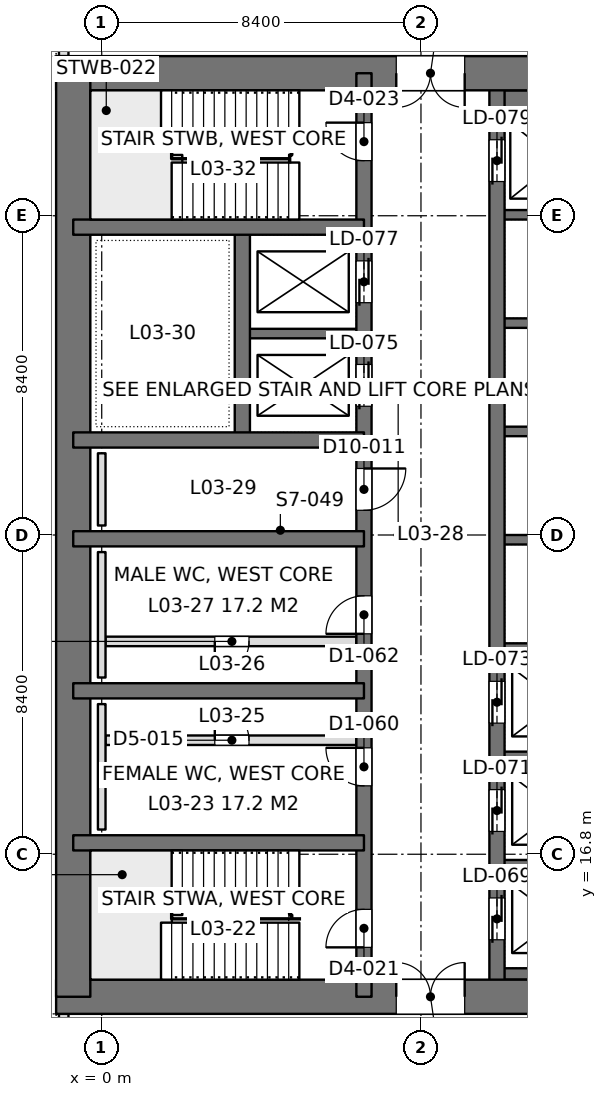
"""IFC4 building model, lengths in metres.
Left out: names, types, materials, properties, quantities, classifications, styles, units other than length and angle.
Written with IfcOpenShell. Run it as: python <this file> out.ifc"""

import sys

from ifc_helpers import new_model, si_unit, direction, frame, frame_2d, origin, place, context, subcontext, project, spatial, rectangle, extrude, element, fill, save


model = new_model("IFC4")
c1 = context("Model", 3, precision=1e-05, world=origin(), true_north=direction((0.0, 1.0)))
c2 = subcontext(c1, "Body", "Model", "MODEL_VIEW")
j1 = project(units=[si_unit("LENGTHUNIT", "METRE"), si_unit("PLANEANGLEUNIT", "RADIAN")], contexts=[c1])
p1 = place(None, origin())
s1 = spatial("IfcSite", under=j1, at=p1, CompositionType="ELEMENT")
p2 = place(p1, origin())
s2 = spatial("IfcBuilding", under=s1, at=p2, CompositionType="ELEMENT")
p3 = place(p2, frame((0.0, 0.0, 14.4)))
s3 = spatial("IfcBuildingStorey", under=s2, at=p3, CompositionType="ELEMENT", Elevation=14.4)
p4 = place(p3, frame((-1.2, 13.05, 0.0), z_axis=(0.0, 0.0, 1.0), x_axis=(1.0, 0.0, 0.0)))
e1 = element("IfcWall", 1, at=p4, inside=s3, PredefinedType="SHEAR", context=c2, shape_type="SweptSolid", body=[
    extrude(rectangle(XDim=18.0, YDim=0.9, at=frame_2d((9.0, 0.0))), origin(), (0.0, 0.0, 1.0), 4.5),
])
p5 = place(p4, frame((8.95, 0.0, 0.0)))
e2 = element("IfcOpeningElement", 2, at=p5, cuts=e1, PredefinedType="OPENING", context=c2, shape_type="SweptSolid", body=[
    extrude(rectangle(XDim=1.8, YDim=2.4, at=frame_2d((0.9, 1.2))), frame((0.0, 0.46, 0.0), z_axis=(0.0, -1.0, 0.0), x_axis=(1.0, 0.0, 0.0)), (0.0, 0.0, 1.0), 0.92),
])
p6 = place(p3, frame((-1.2, 37.35, 0.0), z_axis=(0.0, 0.0, 1.0), x_axis=(1.0, 0.0, 0.0)))
e3 = element("IfcWall", 3, at=p6, inside=s3, PredefinedType="SHEAR", context=c2, shape_type="SweptSolid", body=[
    extrude(rectangle(XDim=18.0, YDim=0.9, at=frame_2d((9.0, 0.0))), origin(), (0.0, 0.0, 1.0), 4.5),
])
p7 = place(p6, frame((8.95, 0.0, 0.0)))
e4 = element("IfcOpeningElement", 4, at=p7, cuts=e3, PredefinedType="OPENING", context=c2, shape_type="SweptSolid", body=[
    extrude(rectangle(XDim=1.8, YDim=2.4, at=frame_2d((0.9, 1.2))), frame((0.0, 0.46, 0.0), z_axis=(0.0, -1.0, 0.0), x_axis=(1.0, 0.0, 0.0)), (0.0, 0.0, 1.0), 0.92),
])
p8 = place(p3, frame((-0.75, 13.05, 0.0), z_axis=(0.0, 0.0, 1.0), x_axis=(0.0, 1.0, 0.0)))
e5 = element("IfcWall", 5, at=p8, inside=s3, PredefinedType="SHEAR", context=c2, shape_type="SweptSolid", body=[
    extrude(rectangle(XDim=24.3, YDim=0.9, at=frame_2d((12.15, 0.0))), origin(), (0.0, 0.0, 1.0), 4.5),
])
p9 = place(p3, frame((6.9, 13.05, 0.0), z_axis=(0.0, 0.0, 1.0), x_axis=(0.0, 1.0, 0.0)))
e6 = element("IfcWall", 6, at=p9, inside=s3, PredefinedType="SHEAR", context=c2, shape_type="SweptSolid", body=[
    extrude(rectangle(XDim=24.3, YDim=0.4, at=frame_2d((12.15, 0.0))), origin(), (0.0, 0.0, 1.0), 4.5),
])
p10 = place(p9, frame((1.3, 0.0, 0.0)))
e7 = element("IfcOpeningElement", 7, at=p10, cuts=e6, PredefinedType="OPENING", context=c2, shape_type="SweptSolid", body=[
    extrude(rectangle(XDim=1.0, YDim=2.2, at=frame_2d((0.5, 1.1))), frame((0.0, 0.21, 0.0), z_axis=(0.0, -1.0, 0.0), x_axis=(1.0, 0.0, 0.0)), (0.0, 0.0, 1.0), 0.42),
])
p11 = place(p9, frame((22.0, 0.0, 0.0)))
e8 = element("IfcOpeningElement", 8, at=p11, cuts=e6, PredefinedType="OPENING", context=c2, shape_type="SweptSolid", body=[
    extrude(rectangle(XDim=1.0, YDim=2.2, at=frame_2d((0.5, 1.1))), frame((0.0, 0.21, 0.0), z_axis=(0.0, -1.0, 0.0), x_axis=(1.0, 0.0, 0.0)), (0.0, 0.0, 1.0), 0.42),
])
p12 = place(p9, frame((5.55, 0.0, 0.0)))
e9 = element("IfcOpeningElement", 9, at=p12, cuts=e6, PredefinedType="OPENING", context=c2, shape_type="SweptSolid", body=[
    extrude(rectangle(XDim=1.0, YDim=2.2, at=frame_2d((0.5, 1.1))), frame((0.0, 0.21, 0.0), z_axis=(0.0, -1.0, 0.0), x_axis=(1.0, 0.0, 0.0)), (0.0, 0.0, 1.0), 0.42),
])
p13 = place(p9, frame((9.55, 0.0, 0.0)))
e10 = element("IfcOpeningElement", 10, at=p13, cuts=e6, PredefinedType="OPENING", context=c2, shape_type="SweptSolid", body=[
    extrude(rectangle(XDim=1.0, YDim=2.2, at=frame_2d((0.5, 1.1))), frame((0.0, 0.21, 0.0), z_axis=(0.0, -1.0, 0.0), x_axis=(1.0, 0.0, 0.0)), (0.0, 0.0, 1.0), 0.42),
])
p14 = place(p9, frame((12.8, 0.0, 0.0)))
e11 = element("IfcOpeningElement", 11, at=p14, cuts=e6, PredefinedType="OPENING", context=c2, shape_type="SweptSolid", body=[
    extrude(rectangle(XDim=1.1, YDim=2.2, at=frame_2d((0.55, 1.1))), frame((0.0, 0.21, 0.0), z_axis=(0.0, -1.0, 0.0), x_axis=(1.0, 0.0, 0.0)), (0.0, 0.0, 1.0), 0.42),
])
p15 = place(p9, frame((15.538, 0.0, 0.0)))
e12 = element("IfcOpeningElement", 12, at=p15, cuts=e6, PredefinedType="OPENING", context=c2, shape_type="SweptSolid", body=[
    extrude(rectangle(XDim=1.1, YDim=2.2, at=frame_2d((0.55, 1.1))), frame((0.0, 0.21, 0.0), z_axis=(0.0, -1.0, 0.0), x_axis=(1.0, 0.0, 0.0)), (0.0, 0.0, 1.0), 0.42),
])
p16 = place(p9, frame((18.262, 0.0, 0.0)))
e13 = element("IfcOpeningElement", 13, at=p16, cuts=e6, PredefinedType="OPENING", context=c2, shape_type="SweptSolid", body=[
    extrude(rectangle(XDim=1.1, YDim=2.2, at=frame_2d((0.55, 1.1))), frame((0.0, 0.21, 0.0), z_axis=(0.0, -1.0, 0.0), x_axis=(1.0, 0.0, 0.0)), (0.0, 0.0, 1.0), 0.42),
])
p17 = place(p3, frame((10.4, 13.05, 0.0), z_axis=(0.0, 0.0, 1.0), x_axis=(0.0, 1.0, 0.0)))
e14 = element("IfcWall", 14, at=p17, inside=s3, PredefinedType="SHEAR", context=c2, shape_type="SweptSolid", body=[
    extrude(rectangle(XDim=24.3, YDim=0.4, at=frame_2d((12.15, 0.0))), origin(), (0.0, 0.0, 1.0), 4.5),
])
p18 = place(p17, frame((1.5, 0.0, 0.0)))
e15 = element("IfcOpeningElement", 15, at=p18, cuts=e14, PredefinedType="OPENING", context=c2, shape_type="SweptSolid", body=[
    extrude(rectangle(XDim=1.1, YDim=2.2, at=frame_2d((0.55, 1.1))), frame((0.0, 0.21, 0.0), z_axis=(0.0, -1.0, 0.0), x_axis=(1.0, 0.0, 0.0)), (0.0, 0.0, 1.0), 0.42),
])
p19 = place(p17, frame((4.35, 0.0, 0.0)))
e16 = element("IfcOpeningElement", 16, at=p19, cuts=e14, PredefinedType="OPENING", context=c2, shape_type="SweptSolid", body=[
    extrude(rectangle(XDim=1.1, YDim=2.2, at=frame_2d((0.55, 1.1))), frame((0.0, 0.21, 0.0), z_axis=(0.0, -1.0, 0.0), x_axis=(1.0, 0.0, 0.0)), (0.0, 0.0, 1.0), 0.42),
])
p20 = place(p17, frame((7.2, 0.0, 0.0)))
e17 = element("IfcOpeningElement", 17, at=p20, cuts=e14, PredefinedType="OPENING", context=c2, shape_type="SweptSolid", body=[
    extrude(rectangle(XDim=1.1, YDim=2.2, at=frame_2d((0.55, 1.1))), frame((0.0, 0.21, 0.0), z_axis=(0.0, -1.0, 0.0), x_axis=(1.0, 0.0, 0.0)), (0.0, 0.0, 1.0), 0.42),
])
p21 = place(p17, frame((21.45, 0.0, 0.0)))
e18 = element("IfcOpeningElement", 18, at=p21, cuts=e14, PredefinedType="OPENING", context=c2, shape_type="SweptSolid", body=[
    extrude(rectangle(XDim=1.1, YDim=2.2, at=frame_2d((0.55, 1.1))), frame((0.0, 0.21, 0.0), z_axis=(0.0, -1.0, 0.0), x_axis=(1.0, 0.0, 0.0)), (0.0, 0.0, 1.0), 0.42),
])
for number, where, z_axis, x_axis in (
    (19, (-0.75, 17.1, 0.0), (0.0, 0.0, 1.0), (1.0, 0.0, 0.0)),
    (20, (-0.75, 21.1, 0.0), (0.0, 0.0, 1.0), (1.0, 0.0, 0.0)),
    (21, (-0.75, 25.1, 0.0), (0.0, 0.0, 1.0), (1.0, 0.0, 0.0)),
    (22, (-0.75, 27.7, 0.0), (0.0, 0.0, 1.0), (1.0, 0.0, 0.0)),
    (23, (-0.75, 33.3, 0.0), (0.0, 0.0, 1.0), (1.0, 0.0, 0.0)),
):
    element("IfcWall", number, at=place(p3, frame(where, z_axis=z_axis, x_axis=x_axis)), inside=s3, PredefinedType="SHEAR", context=c2, shape_type="SweptSolid", body=[
        extrude(rectangle(XDim=7.65, YDim=0.4, at=frame_2d((3.825, 0.0))), origin(), (0.0, 0.0, 1.0), 4.5),
    ])
p22 = place(p3, frame((3.7, 27.7, 0.0), z_axis=(0.0, 0.0, 1.0), x_axis=(0.0, 1.0, 0.0)))
e24 = element("IfcWall", 24, at=p22, inside=s3, PredefinedType="SHEAR", context=c2, shape_type="SweptSolid", body=[
    extrude(rectangle(XDim=5.6, YDim=0.4, at=frame_2d((2.8, 0.0))), origin(), (0.0, 0.0, 1.0), 4.5),
])
p23 = place(p3, frame((3.7, 30.5, 0.0), z_axis=(0.0, 0.0, 1.0), x_axis=(1.0, 0.0, 0.0)))
e25 = element("IfcWall", 25, at=p23, inside=s3, PredefinedType="SHEAR", context=c2, shape_type="SweptSolid", body=[
    extrude(rectangle(XDim=3.2, YDim=0.25, at=frame_2d((1.6, 0.0))), origin(), (0.0, 0.0, 1.0), 4.5),
])
p24 = place(p3, frame((10.4, 13.65, 0.0), z_axis=(0.0, 0.0, 1.0), x_axis=(1.0, 0.0, 0.0)))
e26 = element("IfcWall", 26, at=p24, inside=s3, PredefinedType="SHEAR", context=c2, shape_type="SweptSolid", body=[
    extrude(rectangle(XDim=3.2, YDim=0.3, at=frame_2d((1.6, 0.0))), origin(), (0.0, 0.0, 1.0), 4.5),
])
for number, where, z_axis, x_axis in (
    (27, (10.4, 16.525, 0.0), (0.0, 0.0, 1.0), (1.0, 0.0, 0.0)),
    (28, (10.4, 19.375, 0.0), (0.0, 0.0, 1.0), (1.0, 0.0, 0.0)),
    (29, (10.4, 22.225, 0.0), (0.0, 0.0, 1.0), (1.0, 0.0, 0.0)),
    (30, (10.4, 25.075, 0.0), (0.0, 0.0, 1.0), (1.0, 0.0, 0.0)),
    (31, (10.4, 27.925, 0.0), (0.0, 0.0, 1.0), (1.0, 0.0, 0.0)),
    (32, (10.4, 30.775, 0.0), (0.0, 0.0, 1.0), (1.0, 0.0, 0.0)),
    (33, (10.4, 33.625, 0.0), (0.0, 0.0, 1.0), (1.0, 0.0, 0.0)),
):
    element("IfcWall", number, at=place(p3, frame(where, z_axis=z_axis, x_axis=x_axis)), inside=s3, PredefinedType="SHEAR", context=c2, shape_type="SweptSolid", body=[
        extrude(rectangle(XDim=3.2, YDim=0.25, at=frame_2d((1.6, 0.0))), origin(), (0.0, 0.0, 1.0), 4.5),
    ])
p25 = place(p3, frame((10.4, 36.625, 0.0), z_axis=(0.0, 0.0, 1.0), x_axis=(1.0, 0.0, 0.0)))
e34 = element("IfcWall", 34, at=p25, inside=s3, PredefinedType="SHEAR", context=c2, shape_type="SweptSolid", body=[
    extrude(rectangle(XDim=3.2, YDim=0.55, at=frame_2d((1.6, 0.0))), origin(), (0.0, 0.0, 1.0), 4.5),
])
p26 = place(p3, frame((-1.0, -1.0, 0.0), z_axis=(0.0, 0.0, 1.0), x_axis=(0.0, 1.0, 0.0)))
e35 = element("IfcWall", 35, at=p26, inside=s3, PredefinedType="PARTITIONING", context=c2, shape_type="SweptSolid", body=[
    extrude(rectangle(XDim=13.602, YDim=0.25, at=frame_2d((6.801, 0.0))), origin(), (0.0, 0.0, 1.0), 3.45),
])
p27 = place(p26, frame((4.75, 0.0, 0.0)))
e36 = element("IfcOpeningElement", 36, at=p27, cuts=e35, PredefinedType="OPENING", context=c2, shape_type="SweptSolid", body=[
    extrude(rectangle(XDim=0.9, YDim=2.2, at=frame_2d((0.45, 1.1))), frame((0.0, 0.135, 0.0), z_axis=(0.0, -1.0, 0.0), x_axis=(1.0, 0.0, 0.0)), (0.0, 0.0, 1.0), 0.27),
])
p28 = place(p3, frame((-1.0, 37.8, 0.0), z_axis=(0.0, 0.0, 1.0), x_axis=(0.0, 1.0, 0.0)))
e37 = element("IfcWall", 37, at=p28, inside=s3, PredefinedType="PARTITIONING", context=c2, shape_type="SweptSolid", body=[
    extrude(rectangle(XDim=6.48, YDim=0.25, at=frame_2d((3.24, 0.0))), origin(), (0.0, 0.0, 1.0), 3.45),
])
p29 = place(p28, frame((1.65, 0.0, 0.0)))
e38 = element("IfcOpeningElement", 38, at=p29, cuts=e37, PredefinedType="OPENING", context=c2, shape_type="SweptSolid", body=[
    extrude(rectangle(XDim=0.9, YDim=2.2, at=frame_2d((0.45, 1.1))), frame((0.0, 0.135, 0.0), z_axis=(0.0, -1.0, 0.0), x_axis=(1.0, 0.0, 0.0)), (0.0, 0.0, 1.0), 0.27),
])
p30 = place(p3, frame((0.1, 22.4, 0.0), z_axis=(0.0, 0.0, 1.0), x_axis=(1.0, 0.0, 0.0)))
e39 = element("IfcWall", 39, at=p30, inside=s3, PredefinedType="PARTITIONING", context=c2, shape_type="SweptSolid", body=[
    extrude(rectangle(XDim=6.6, YDim=0.25, at=frame_2d((3.3, 0.0))), origin(), (0.0, 0.0, 1.0), 4.3),
])
p31 = place(p30, frame((2.875, 0.0, 0.0)))
e40 = element("IfcOpeningElement", 40, at=p31, cuts=e39, PredefinedType="OPENING", context=c2, shape_type="SweptSolid", body=[
    extrude(rectangle(XDim=0.9, YDim=2.2, at=frame_2d((0.45, 1.1))), frame((0.0, 0.135, 0.0), z_axis=(0.0, -1.0, 0.0), x_axis=(1.0, 0.0, 0.0)), (0.0, 0.0, 1.0), 0.27),
])
p32 = place(p3, frame((0.1, 19.8, 0.0), z_axis=(0.0, 0.0, 1.0), x_axis=(1.0, 0.0, 0.0)))
e41 = element("IfcWall", 41, at=p32, inside=s3, PredefinedType="PARTITIONING", context=c2, shape_type="SweptSolid", body=[
    extrude(rectangle(XDim=6.6, YDim=0.25, at=frame_2d((3.3, 0.0))), origin(), (0.0, 0.0, 1.0), 4.3),
])
p33 = place(p32, frame((2.875, 0.0, 0.0)))
e42 = element("IfcOpeningElement", 42, at=p33, cuts=e41, PredefinedType="OPENING", context=c2, shape_type="SweptSolid", body=[
    extrude(rectangle(XDim=0.9, YDim=2.2, at=frame_2d((0.45, 1.1))), frame((0.0, 0.135, 0.0), z_axis=(0.0, -1.0, 0.0), x_axis=(1.0, 0.0, 0.0)), (0.0, 0.0, 1.0), 0.27),
])
for number, where, z_axis, x_axis in (
    (43, (0.0, 17.45, 0.0), (0.0, 0.0, 1.0), (0.0, 1.0, 0.0)),
    (44, (0.0, 21.45, 0.0), (0.0, 0.0, 1.0), (0.0, 1.0, 0.0)),
):
    element("IfcWall", number, at=place(p3, frame(where, z_axis=z_axis, x_axis=x_axis)), inside=s3, PredefinedType="PLUMBINGWALL", context=c2, shape_type="SweptSolid", body=[
        extrude(rectangle(XDim=3.3, YDim=0.2, at=frame_2d((1.65, 0.0))), origin(), (0.0, 0.0, 1.0), 1.2),
    ])
p34 = place(p3, frame((0.0, 25.45, 0.0), z_axis=(0.0, 0.0, 1.0), x_axis=(0.0, 1.0, 0.0)))
e45 = element("IfcWall", 45, at=p34, inside=s3, PredefinedType="PLUMBINGWALL", context=c2, shape_type="SweptSolid", body=[
    extrude(rectangle(XDim=1.9, YDim=0.2, at=frame_2d((0.95, 0.0))), origin(), (0.0, 0.0, 1.0), 1.2),
])
p35 = place(p5, origin())
e46 = element("IfcDoor", 46, at=p35, inside=s3, OperationType="DOUBLE_DOOR_SINGLE_SWING", PredefinedType="DOOR", context=c2, shape_type="SweptSolid", body=[
    extrude(rectangle(XDim=1.8, YDim=2.4, at=frame_2d((0.9, 1.2))), frame((0.0, 0.025, 0.0), z_axis=(0.0, -1.0, 0.0), x_axis=(1.0, 0.0, 0.0)), (0.0, 0.0, 1.0), 0.05),
])
fill(e2, e46)
p36 = place(p7, frame((1.8, 0.0, 0.0), z_axis=(0.0, 0.0, 1.0), x_axis=(-1.0, 0.0, 0.0)))
e47 = element("IfcDoor", 47, at=p36, inside=s3, OperationType="DOUBLE_DOOR_SINGLE_SWING", PredefinedType="DOOR", context=c2, shape_type="SweptSolid", body=[
    extrude(rectangle(XDim=1.8, YDim=2.4, at=frame_2d((0.9, 1.2))), frame((0.0, 0.025, 0.0), z_axis=(0.0, -1.0, 0.0), x_axis=(1.0, 0.0, 0.0)), (0.0, 0.0, 1.0), 0.05),
])
fill(e4, e47)
p37 = place(p10, origin())
e48 = element("IfcDoor", 48, at=p37, inside=s3, OperationType="SINGLE_SWING_LEFT", PredefinedType="DOOR", context=c2, shape_type="SweptSolid", body=[
    extrude(rectangle(XDim=1.0, YDim=2.2, at=frame_2d((0.5, 1.1))), frame((0.0, 0.025, 0.0), z_axis=(0.0, -1.0, 0.0), x_axis=(1.0, 0.0, 0.0)), (0.0, 0.0, 1.0), 0.05),
])
fill(e7, e48)
p38 = place(p11, origin())
e49 = element("IfcDoor", 49, at=p38, inside=s3, OperationType="SINGLE_SWING_RIGHT", PredefinedType="DOOR", context=c2, shape_type="SweptSolid", body=[
    extrude(rectangle(XDim=1.0, YDim=2.2, at=frame_2d((0.5, 1.1))), frame((0.0, 0.025, 0.0), z_axis=(0.0, -1.0, 0.0), x_axis=(1.0, 0.0, 0.0)), (0.0, 0.0, 1.0), 0.05),
])
fill(e8, e49)
p39 = place(p12, origin())
e50 = element("IfcDoor", 50, at=p39, inside=s3, OperationType="SINGLE_SWING_RIGHT", PredefinedType="DOOR", context=c2, shape_type="SweptSolid", body=[
    extrude(rectangle(XDim=1.0, YDim=2.2, at=frame_2d((0.5, 1.1))), frame((0.0, 0.025, 0.0), z_axis=(0.0, -1.0, 0.0), x_axis=(1.0, 0.0, 0.0)), (0.0, 0.0, 1.0), 0.05),
])
fill(e9, e50)
p40 = place(p13, origin())
e51 = element("IfcDoor", 51, at=p40, inside=s3, OperationType="SINGLE_SWING_LEFT", PredefinedType="DOOR", context=c2, shape_type="SweptSolid", body=[
    extrude(rectangle(XDim=1.0, YDim=2.2, at=frame_2d((0.5, 1.1))), frame((0.0, 0.025, 0.0), z_axis=(0.0, -1.0, 0.0), x_axis=(1.0, 0.0, 0.0)), (0.0, 0.0, 1.0), 0.05),
])
fill(e10, e51)
p41 = place(p14, frame((1.1, 0.0, 0.0), z_axis=(0.0, 0.0, 1.0), x_axis=(-1.0, 0.0, 0.0)))
e52 = element("IfcDoor", 52, at=p41, inside=s3, OperationType="SINGLE_SWING_LEFT", PredefinedType="DOOR", context=c2, shape_type="SweptSolid", body=[
    extrude(rectangle(XDim=1.1, YDim=2.2, at=frame_2d((0.55, 1.1))), frame((0.0, 0.025, 0.0), z_axis=(0.0, -1.0, 0.0), x_axis=(1.0, 0.0, 0.0)), (0.0, 0.0, 1.0), 0.05),
])
fill(e11, e52)
p42 = place(p18, origin())
e53 = element("IfcDoor", 53, at=p42, inside=s3, OperationType="DOUBLE_DOOR_SLIDING", PredefinedType="DOOR", context=c2, shape_type="SweptSolid", body=[
    extrude(rectangle(XDim=1.1, YDim=2.2, at=frame_2d((0.55, 1.1))), frame((0.0, 0.025, 0.0), z_axis=(0.0, -1.0, 0.0), x_axis=(1.0, 0.0, 0.0)), (0.0, 0.0, 1.0), 0.05),
])
fill(e15, e53)
p43 = place(p19, origin())
e54 = element("IfcDoor", 54, at=p43, inside=s3, OperationType="DOUBLE_DOOR_SLIDING", PredefinedType="DOOR", context=c2, shape_type="SweptSolid", body=[
    extrude(rectangle(XDim=1.1, YDim=2.2, at=frame_2d((0.55, 1.1))), frame((0.0, 0.025, 0.0), z_axis=(0.0, -1.0, 0.0), x_axis=(1.0, 0.0, 0.0)), (0.0, 0.0, 1.0), 0.05),
])
fill(e16, e54)
p44 = place(p20, origin())
e55 = element("IfcDoor", 55, at=p44, inside=s3, OperationType="DOUBLE_DOOR_SLIDING", PredefinedType="DOOR", context=c2, shape_type="SweptSolid", body=[
    extrude(rectangle(XDim=1.1, YDim=2.2, at=frame_2d((0.55, 1.1))), frame((0.0, 0.025, 0.0), z_axis=(0.0, -1.0, 0.0), x_axis=(1.0, 0.0, 0.0)), (0.0, 0.0, 1.0), 0.05),
])
fill(e17, e55)
p45 = place(p21, origin())
e56 = element("IfcDoor", 56, at=p45, inside=s3, OperationType="DOUBLE_DOOR_SLIDING", PredefinedType="DOOR", context=c2, shape_type="SweptSolid", body=[
    extrude(rectangle(XDim=1.1, YDim=2.2, at=frame_2d((0.55, 1.1))), frame((0.0, 0.025, 0.0), z_axis=(0.0, -1.0, 0.0), x_axis=(1.0, 0.0, 0.0)), (0.0, 0.0, 1.0), 0.05),
])
fill(e18, e56)
p46 = place(p15, origin())
e57 = element("IfcDoor", 57, at=p46, inside=s3, OperationType="DOUBLE_DOOR_SLIDING", PredefinedType="DOOR", context=c2, shape_type="SweptSolid", body=[
    extrude(rectangle(XDim=1.1, YDim=2.2, at=frame_2d((0.55, 1.1))), frame((0.0, 0.025, 0.0), z_axis=(0.0, -1.0, 0.0), x_axis=(1.0, 0.0, 0.0)), (0.0, 0.0, 1.0), 0.05),
])
fill(e12, e57)
p47 = place(p16, origin())
e58 = element("IfcDoor", 58, at=p47, inside=s3, OperationType="DOUBLE_DOOR_SLIDING", PredefinedType="DOOR", context=c2, shape_type="SweptSolid", body=[
    extrude(rectangle(XDim=1.1, YDim=2.2, at=frame_2d((0.55, 1.1))), frame((0.0, 0.025, 0.0), z_axis=(0.0, -1.0, 0.0), x_axis=(1.0, 0.0, 0.0)), (0.0, 0.0, 1.0), 0.05),
])
fill(e13, e58)
p48 = place(p31, frame((0.9, 0.0, 0.0), z_axis=(0.0, 0.0, 1.0), x_axis=(-1.0, 0.0, 0.0)))
e59 = element("IfcDoor", 59, at=p48, inside=s3, OperationType="SINGLE_SWING_RIGHT", PredefinedType="DOOR", context=c2, shape_type="SweptSolid", body=[
    extrude(rectangle(XDim=0.9, YDim=2.2, at=frame_2d((0.45, 1.1))), frame((0.0, 0.025, 0.0), z_axis=(0.0, -1.0, 0.0), x_axis=(1.0, 0.0, 0.0)), (0.0, 0.0, 1.0), 0.05),
])
fill(e40, e59)
p49 = place(p33, origin())
e60 = element("IfcDoor", 60, at=p49, inside=s3, OperationType="SINGLE_SWING_LEFT", PredefinedType="DOOR", context=c2, shape_type="SweptSolid", body=[
    extrude(rectangle(XDim=0.9, YDim=2.2, at=frame_2d((0.45, 1.1))), frame((0.0, 0.025, 0.0), z_axis=(0.0, -1.0, 0.0), x_axis=(1.0, 0.0, 0.0)), (0.0, 0.0, 1.0), 0.05),
])
fill(e42, e60)
save(model, sys.argv[1])
